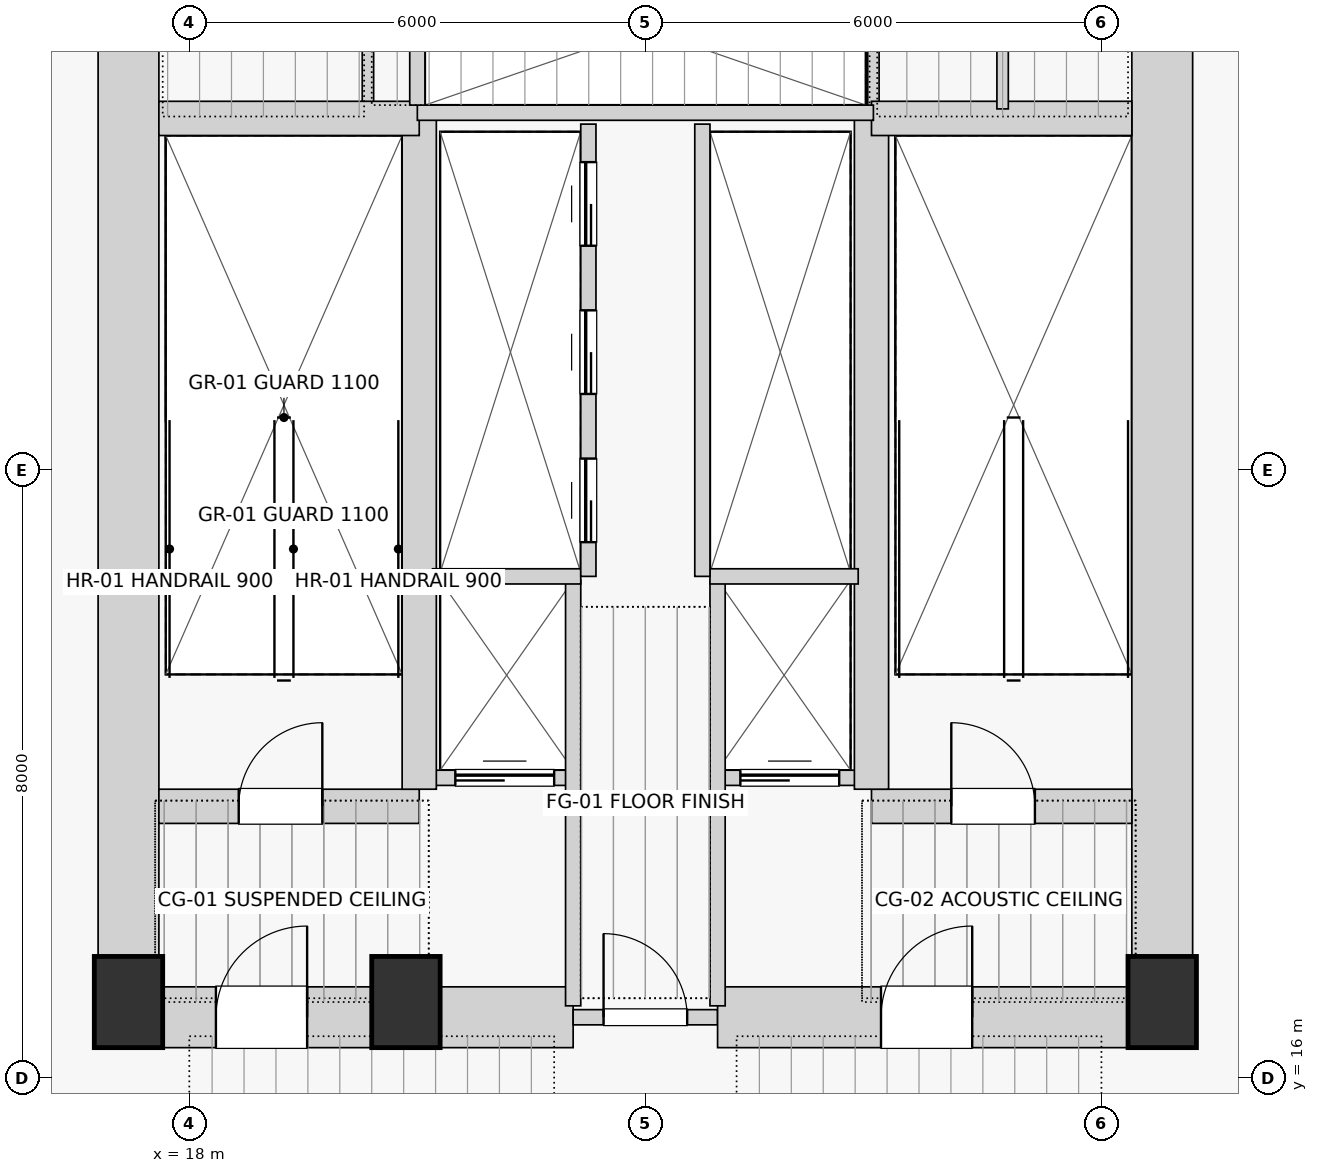
"""IFC4 building model, lengths in metres.
Left out: names, types, materials, properties, quantities, classifications, styles, units other than length and angle.
Written with IfcOpenShell. Run it as: python <this file> out.ifc"""

import sys

from ifc_helpers import new_model, si_unit, direction, frame, frame_2d, origin, origin_2d, place, context, subcontext, project, spatial, rectangle, extrude, source, transform, mapped, element, fill, save


model = new_model("IFC4")
c1 = context("Model", 3, precision=1e-05, world=origin(), true_north=direction((0.0, 1.0)))
c2 = subcontext(c1, "Body", "Model", "MODEL_VIEW")
j1 = project(units=[si_unit("LENGTHUNIT", "METRE"), si_unit("PLANEANGLEUNIT", "RADIAN")], contexts=[c1])
p1 = place(None, origin())
s1 = spatial("IfcSite", under=j1, at=p1, CompositionType="ELEMENT")
p2 = place(p1, origin())
s2 = spatial("IfcBuilding", under=s1, at=p2, CompositionType="ELEMENT")
p3 = place(p2, frame((0.0, 0.0, 22.8)))
s3 = spatial("IfcBuildingStorey", under=s2, at=p3, CompositionType="ELEMENT", Elevation=22.8)
for number, where, z_axis, x_axis in (
    (1, (17.2, 17.0, 0.0), (0.0, 0.0, 1.0), (1.0, 0.0, 0.0)),
    (2, (20.85, 17.0, 0.0), (0.0, 0.0, 1.0), (1.0, 0.0, 0.0)),
    (3, (30.8, 17.0, 0.0), (0.0, 0.0, 1.0), (1.0, 0.0, 0.0)),
):
    element("IfcColumn", number, at=place(p3, frame(where, z_axis=z_axis, x_axis=x_axis)), inside=s3, PredefinedType="PILASTER", context=c2, shape_type="SweptSolid", body=[
        extrude(rectangle(XDim=0.9, YDim=1.2, at=origin_2d()), origin(), (0.0, 0.0, 1.0), 4.5),
    ])
for number, where, z_axis, x_axis in (
    (4, (17.2, 16.8, 0.0), (0.0, 0.0, 1.0), (0.0, 1.0, 0.0)),
    (5, (30.8, 16.8, 0.0), (0.0, 0.0, 1.0), (0.0, 1.0, 0.0)),
):
    element("IfcWall", number, at=place(p3, frame(where, z_axis=z_axis, x_axis=x_axis)), inside=s3, PredefinedType="SHEAR", context=c2, shape_type="SweptSolid", body=[
        extrude(rectangle(XDim=14.2, YDim=0.8, at=frame_2d((7.1, 0.0))), origin(), (0.0, 0.0, 1.0), 4.25),
    ])
p4 = place(p3, frame((17.2, 16.8, 0.0), z_axis=(0.0, 0.0, 1.0), x_axis=(1.0, 0.0, 0.0)))
e6 = element("IfcWall", 6, at=p4, inside=s3, PredefinedType="SHEAR", context=c2, shape_type="SweptSolid", body=[
    extrude(rectangle(XDim=5.85, YDim=0.8, at=frame_2d((2.925, 0.0))), origin(), (0.0, 0.0, 1.0), 4.25),
])
p5 = place(p4, frame((1.15, 0.0, 0.0)))
e7 = element("IfcOpeningElement", 7, at=p5, cuts=e6, PredefinedType="OPENING", context=c2, shape_type="SweptSolid", body=[
    extrude(rectangle(XDim=1.2, YDim=2.03, at=frame_2d((0.6, 1.015))), frame((0.0, 0.41, 0.0), z_axis=(0.0, -1.0, 0.0), x_axis=(1.0, 0.0, 0.0)), (0.0, 0.0, 1.0), 0.82),
])
p6 = place(p3, frame((23.05, 16.8, 0.0), z_axis=(0.0, 0.0, 1.0), x_axis=(1.0, 0.0, 0.0)))
e8 = element("IfcWall", 8, at=p6, inside=s3, PredefinedType="SOLIDWALL", context=c2, shape_type="SweptSolid", body=[
    extrude(rectangle(XDim=1.9, YDim=0.2, at=frame_2d((0.95, 0.0))), origin(), (0.0, 0.0, 1.0), 3.4),
])
p7 = place(p6, frame((0.4, 0.0, 0.0)))
e9 = element("IfcOpeningElement", 9, at=p7, cuts=e8, PredefinedType="OPENING", context=c2, shape_type="SweptSolid", body=[
    extrude(rectangle(XDim=1.1, YDim=2.03, at=frame_2d((0.55, 1.015))), frame((0.0, 0.11, 0.0), z_axis=(0.0, -1.0, 0.0), x_axis=(1.0, 0.0, 0.0)), (0.0, 0.0, 1.0), 0.22),
])
p8 = place(p3, frame((24.95, 16.8, 0.0), z_axis=(0.0, 0.0, 1.0), x_axis=(1.0, 0.0, 0.0)))
e10 = element("IfcWall", 10, at=p8, inside=s3, PredefinedType="SHEAR", context=c2, shape_type="SweptSolid", body=[
    extrude(rectangle(XDim=5.85, YDim=0.8, at=frame_2d((2.925, 0.0))), origin(), (0.0, 0.0, 1.0), 4.25),
])
p9 = place(p8, frame((2.15, 0.0, 0.0)))
e11 = element("IfcOpeningElement", 11, at=p9, cuts=e10, PredefinedType="OPENING", context=c2, shape_type="SweptSolid", body=[
    extrude(rectangle(XDim=1.2, YDim=2.03, at=frame_2d((0.6, 1.015))), frame((0.0, 0.41, 0.0), z_axis=(0.0, -1.0, 0.0), x_axis=(1.0, 0.0, 0.0)), (0.0, 0.0, 1.0), 0.82),
])
for number, where, z_axis, x_axis in (
    (12, (20.35, 28.65, 0.0), (0.0, 0.0, 1.0), (0.0, 1.0, 0.0)),
    (13, (27.0, 28.65, 0.0), (0.0, 0.0, 1.0), (0.0, 1.0, 0.0)),
):
    element("IfcWall", number, at=place(p3, frame(where, z_axis=z_axis, x_axis=x_axis)), inside=s3, PredefinedType="PARTITIONING", context=c2, shape_type="SweptSolid", body=[
        extrude(rectangle(XDim=2.2, YDim=0.15, at=frame_2d((1.1, 0.0))), origin(), (0.0, 0.0, 1.0), 4.25),
    ])
p10 = place(p3, frame((17.6, 19.575, 0.0), z_axis=(0.0, 0.0, 1.0), x_axis=(1.0, 0.0, 0.0)))
e14 = element("IfcWall", 14, at=p10, inside=s3, PredefinedType="SHEAR", context=c2, shape_type="SweptSolid", body=[
    extrude(rectangle(XDim=3.425, YDim=0.45, at=frame_2d((1.712, 0.0))), origin(), (0.0, 0.0, 1.0), 4.25),
])
p11 = place(p10, frame((1.05, 0.0, 0.0)))
e15 = element("IfcOpeningElement", 15, at=p11, cuts=e14, PredefinedType="OPENING", context=c2, shape_type="SweptSolid", body=[
    extrude(rectangle(XDim=1.1, YDim=2.03, at=frame_2d((0.55, 1.015))), frame((0.0, 0.235, 0.0), z_axis=(0.0, -1.0, 0.0), x_axis=(1.0, 0.0, 0.0)), (0.0, 0.0, 1.0), 0.47),
])
p12 = place(p3, frame((21.2, 19.95, 0.0), z_axis=(0.0, 0.0, 1.0), x_axis=(1.0, 0.0, 0.0)))
e16 = element("IfcWall", 16, at=p12, inside=s3, PredefinedType="SOLIDWALL", context=c2, shape_type="SweptSolid", body=[
    extrude(rectangle(XDim=1.85, YDim=0.2, at=frame_2d((0.925, 0.0))), origin(), (0.0, 0.0, 1.0), 4.25),
])
p13 = place(p12, frame((0.3, 0.0, 0.0)))
e17 = element("IfcOpeningElement", 17, at=p13, cuts=e16, PredefinedType="OPENING", context=c2, shape_type="SweptSolid", body=[
    extrude(rectangle(XDim=1.3, YDim=2.25, at=frame_2d((0.65, 1.125))), frame((0.0, 0.11, 0.0), z_axis=(0.0, -1.0, 0.0), x_axis=(1.0, 0.0, 0.0)), (0.0, 0.0, 1.0), 0.22),
])
p14 = place(p3, frame((24.95, 19.95, 0.0), z_axis=(0.0, 0.0, 1.0), x_axis=(1.0, 0.0, 0.0)))
e18 = element("IfcWall", 18, at=p14, inside=s3, PredefinedType="SOLIDWALL", context=c2, shape_type="SweptSolid", body=[
    extrude(rectangle(XDim=1.85, YDim=0.2, at=frame_2d((0.925, 0.0))), origin(), (0.0, 0.0, 1.0), 4.25),
])
p15 = place(p14, frame((0.3, 0.0, 0.0)))
e19 = element("IfcOpeningElement", 19, at=p15, cuts=e18, PredefinedType="OPENING", context=c2, shape_type="SweptSolid", body=[
    extrude(rectangle(XDim=1.3, YDim=2.25, at=frame_2d((0.65, 1.125))), frame((0.0, 0.11, 0.0), z_axis=(0.0, -1.0, 0.0), x_axis=(1.0, 0.0, 0.0)), (0.0, 0.0, 1.0), 0.22),
])
p16 = place(p3, frame((26.975, 19.575, 0.0), z_axis=(0.0, 0.0, 1.0), x_axis=(1.0, 0.0, 0.0)))
e20 = element("IfcWall", 20, at=p16, inside=s3, PredefinedType="SHEAR", context=c2, shape_type="SweptSolid", body=[
    extrude(rectangle(XDim=3.425, YDim=0.45, at=frame_2d((1.712, 0.0))), origin(), (0.0, 0.0, 1.0), 4.25),
])
p17 = place(p16, frame((1.05, 0.0, 0.0)))
e21 = element("IfcOpeningElement", 21, at=p17, cuts=e20, PredefinedType="OPENING", context=c2, shape_type="SweptSolid", body=[
    extrude(rectangle(XDim=1.1, YDim=2.03, at=frame_2d((0.55, 1.015))), frame((0.0, 0.235, 0.0), z_axis=(0.0, -1.0, 0.0), x_axis=(1.0, 0.0, 0.0)), (0.0, 0.0, 1.0), 0.47),
])
for number, where, z_axis, x_axis in (
    (22, (21.025, 19.8, 0.0), (0.0, 0.0, 1.0), (0.0, 1.0, 0.0)),
    (23, (26.975, 19.8, 0.0), (0.0, 0.0, 1.0), (0.0, 1.0, 0.0)),
):
    element("IfcWall", number, at=place(p3, frame(where, z_axis=z_axis, x_axis=x_axis)), inside=s3, PredefinedType="SHEAR", context=c2, shape_type="SweptSolid", body=[
        extrude(rectangle(XDim=8.825, YDim=0.45, at=frame_2d((4.413, 0.0))), origin(), (0.0, 0.0, 1.0), 4.25),
    ])
for number, where, z_axis, x_axis in (
    (24, (17.6, 28.625, 0.0), (0.0, 0.0, 1.0), (1.0, 0.0, 0.0)),
    (25, (26.975, 28.625, 0.0), (0.0, 0.0, 1.0), (1.0, 0.0, 0.0)),
):
    element("IfcWall", number, at=place(p3, frame(where, z_axis=z_axis, x_axis=x_axis)), inside=s3, PredefinedType="SHEAR", context=c2, shape_type="SweptSolid", body=[
        extrude(rectangle(XDim=3.425, YDim=0.45, at=frame_2d((1.712, 0.0))), origin(), (0.0, 0.0, 1.0), 4.25),
    ])
for number, where, z_axis, x_axis in (
    (26, (23.05, 16.95, 0.0), (0.0, 0.0, 1.0), (0.0, 1.0, 0.0)),
    (27, (24.95, 16.95, 0.0), (0.0, 0.0, 1.0), (0.0, 1.0, 0.0)),
):
    element("IfcWall", number, at=place(p3, frame(where, z_axis=z_axis, x_axis=x_axis)), inside=s3, PredefinedType="SOLIDWALL", context=c2, shape_type="SweptSolid", body=[
        extrude(rectangle(XDim=5.6, YDim=0.2, at=frame_2d((2.8, 0.0))), origin(), (0.0, 0.0, 1.0), 4.25),
    ])
for number, where, z_axis, x_axis in (
    (28, (21.2, 22.6, 0.0), (0.0, 0.0, 1.0), (1.0, 0.0, 0.0)),
    (29, (24.85, 22.6, 0.0), (0.0, 0.0, 1.0), (1.0, 0.0, 0.0)),
):
    element("IfcWall", number, at=place(p3, frame(where, z_axis=z_axis, x_axis=x_axis)), inside=s3, PredefinedType="SOLIDWALL", context=c2, shape_type="SweptSolid", body=[
        extrude(rectangle(XDim=1.95, YDim=0.2, at=frame_2d((0.975, 0.0))), origin(), (0.0, 0.0, 1.0), 4.25),
    ])
p18 = place(p3, frame((21.0, 28.7, 0.0), z_axis=(0.0, 0.0, 1.0), x_axis=(1.0, 0.0, 0.0)))
e30 = element("IfcWall", 30, at=p18, inside=s3, PredefinedType="SOLIDWALL", context=c2, shape_type="SweptSolid", body=[
    extrude(rectangle(XDim=6.0, YDim=0.2, at=frame_2d((3.0, 0.0))), origin(), (0.0, 0.0, 1.0), 4.25),
])
p19 = place(p3, frame((21.0, 28.8, 0.0), z_axis=(0.0, 0.0, 1.0), x_axis=(0.0, 1.0, 0.0)))
e31 = element("IfcWall", 31, at=p19, inside=s3, PredefinedType="SOLIDWALL", context=c2, shape_type="SweptSolid", body=[
    extrude(rectangle(XDim=1.6, YDim=0.2, at=frame_2d((0.8, 0.0))), origin(), (0.0, 0.0, 1.0), 4.25),
])
p20 = place(p3, frame((23.25, 22.6, 0.0), z_axis=(0.0, 0.0, 1.0), x_axis=(0.0, 1.0, 0.0)))
e32 = element("IfcWall", 32, at=p20, inside=s3, PredefinedType="SOLIDWALL", context=c2, shape_type="SweptSolid", body=[
    extrude(rectangle(XDim=5.95, YDim=0.2, at=frame_2d((2.975, 0.0))), origin(), (0.0, 0.0, 1.0), 4.25),
])
p21 = place(p20, frame((0.45, 0.0, 0.0)))
e33 = element("IfcOpeningElement", 33, at=p21, cuts=e32, PredefinedType="OPENING", context=c2, shape_type="SweptSolid", body=[
    extrude(rectangle(XDim=1.1, YDim=2.08, at=frame_2d((0.55, 1.04))), frame((0.0, 0.11, 0.0), z_axis=(0.0, -1.0, 0.0), x_axis=(1.0, 0.0, 0.0)), (0.0, 0.0, 1.0), 0.22),
])
p22 = place(p20, frame((2.4, 0.0, 0.0)))
e34 = element("IfcOpeningElement", 34, at=p22, cuts=e32, PredefinedType="OPENING", context=c2, shape_type="SweptSolid", body=[
    extrude(rectangle(XDim=1.1, YDim=2.08, at=frame_2d((0.55, 1.04))), frame((0.0, 0.11, 0.0), z_axis=(0.0, -1.0, 0.0), x_axis=(1.0, 0.0, 0.0)), (0.0, 0.0, 1.0), 0.22),
])
p23 = place(p20, frame((4.35, 0.0, 0.0)))
e35 = element("IfcOpeningElement", 35, at=p23, cuts=e32, PredefinedType="OPENING", context=c2, shape_type="SweptSolid", body=[
    extrude(rectangle(XDim=1.1, YDim=2.08, at=frame_2d((0.55, 1.04))), frame((0.0, 0.11, 0.0), z_axis=(0.0, -1.0, 0.0), x_axis=(1.0, 0.0, 0.0)), (0.0, 0.0, 1.0), 0.22),
])
p24 = place(p3, frame((24.75, 22.6, 0.0), z_axis=(0.0, 0.0, 1.0), x_axis=(0.0, 1.0, 0.0)))
e36 = element("IfcWall", 36, at=p24, inside=s3, PredefinedType="SOLIDWALL", context=c2, shape_type="SweptSolid", body=[
    extrude(rectangle(XDim=5.95, YDim=0.2, at=frame_2d((2.975, 0.0))), origin(), (0.0, 0.0, 1.0), 4.25),
])
p25 = place(p3, frame((28.7, 28.75, 0.0), z_axis=(0.0, 0.0, 1.0), x_axis=(0.0, 1.0, 0.0)))
e37 = element("IfcWall", 37, at=p25, inside=s3, PredefinedType="PARTITIONING", context=c2, shape_type="SweptSolid", body=[
    extrude(rectangle(XDim=2.0, YDim=0.15, at=frame_2d((1.0, 0.0))), origin(), (0.0, 0.0, 1.0), 4.25),
])
m1 = source(origin(), c2, "Body", "SweptSolid", [
    extrude(rectangle(XDim=1.2, YDim=2.03, at=frame_2d((0.6, 1.015))), frame((0.0, 0.025, 0.0), z_axis=(0.0, -1.0, 0.0), x_axis=(1.0, 0.0, 0.0)), (0.0, 0.0, 1.0), 0.05),
])
p26 = place(p5, origin())
e38 = element("IfcDoor", 38, at=p26, inside=s3, OperationType="SINGLE_SWING_RIGHT", PredefinedType="DOOR", context=c2, shape_type="MappedRepresentation", body=[
    mapped(m1, transform((0.0, 0.0, 0.0), scale=1.0)),
])
fill(e7, e38)
m2 = source(origin(), c2, "Body", "SweptSolid", [
    extrude(rectangle(XDim=1.1, YDim=2.03, at=frame_2d((0.55, 1.015))), frame((0.0, 0.025, 0.0), z_axis=(0.0, -1.0, 0.0), x_axis=(1.0, 0.0, 0.0)), (0.0, 0.0, 1.0), 0.05),
])
p27 = place(p7, origin())
e39 = element("IfcDoor", 39, at=p27, inside=s3, OperationType="SINGLE_SWING_LEFT", PredefinedType="DOOR", context=c2, shape_type="MappedRepresentation", body=[
    mapped(m2, transform((0.0, 0.0, 0.0), scale=1.0)),
])
fill(e9, e39)
p28 = place(p9, origin())
e40 = element("IfcDoor", 40, at=p28, inside=s3, OperationType="SINGLE_SWING_RIGHT", PredefinedType="DOOR", context=c2, shape_type="MappedRepresentation", body=[
    mapped(m1, transform((0.0, 0.0, 0.0), scale=1.0)),
])
fill(e11, e40)
p29 = place(p11, origin())
e41 = element("IfcDoor", 41, at=p29, inside=s3, OperationType="SINGLE_SWING_RIGHT", PredefinedType="DOOR", context=c2, shape_type="MappedRepresentation", body=[
    mapped(m2, transform((0.0, 0.0, 0.0), scale=1.0)),
])
fill(e15, e41)
m3 = source(origin(), c2, "Body", "SweptSolid", [
    extrude(rectangle(XDim=1.3, YDim=2.25, at=frame_2d((0.65, 1.125))), frame((0.0, 0.025, 0.0), z_axis=(0.0, -1.0, 0.0), x_axis=(1.0, 0.0, 0.0)), (0.0, 0.0, 1.0), 0.05),
])
p30 = place(p13, origin())
e42 = element("IfcDoor", 42, at=p30, inside=s3, OperationType="SLIDING_TO_LEFT", PredefinedType="DOOR", context=c2, shape_type="MappedRepresentation", body=[
    mapped(m3, transform((0.0, 0.0, 0.0), scale=1.0)),
])
fill(e17, e42)
p31 = place(p15, origin())
e43 = element("IfcDoor", 43, at=p31, inside=s3, OperationType="SLIDING_TO_LEFT", PredefinedType="DOOR", context=c2, shape_type="MappedRepresentation", body=[
    mapped(m3, transform((0.0, 0.0, 0.0), scale=1.0)),
])
fill(e19, e43)
p32 = place(p17, origin())
e44 = element("IfcDoor", 44, at=p32, inside=s3, OperationType="SINGLE_SWING_LEFT", PredefinedType="DOOR", context=c2, shape_type="MappedRepresentation", body=[
    mapped(m2, transform((0.0, 0.0, 0.0), scale=1.0)),
])
fill(e21, e44)
m4 = source(origin(), c2, "Body", "SweptSolid", [
    extrude(rectangle(XDim=1.1, YDim=2.08, at=frame_2d((0.55, 1.04))), frame((0.0, 0.025, 0.0), z_axis=(0.0, -1.0, 0.0), x_axis=(1.0, 0.0, 0.0)), (0.0, 0.0, 1.0), 0.05),
])
p33 = place(p21, origin())
e45 = element("IfcDoor", 45, at=p33, inside=s3, OperationType="SLIDING_TO_LEFT", PredefinedType="DOOR", context=c2, shape_type="MappedRepresentation", body=[
    mapped(m4, transform((0.0, 0.0, 0.0), scale=1.0)),
])
fill(e33, e45)
p34 = place(p22, origin())
e46 = element("IfcDoor", 46, at=p34, inside=s3, OperationType="SLIDING_TO_LEFT", PredefinedType="DOOR", context=c2, shape_type="MappedRepresentation", body=[
    mapped(m4, transform((0.0, 0.0, 0.0), scale=1.0)),
])
fill(e34, e46)
p35 = place(p23, origin())
e47 = element("IfcDoor", 47, at=p35, inside=s3, OperationType="SLIDING_TO_LEFT", PredefinedType="DOOR", context=c2, shape_type="MappedRepresentation", body=[
    mapped(m4, transform((0.0, 0.0, 0.0), scale=1.0)),
])
fill(e35, e47)
save(model, sys.argv[1])
